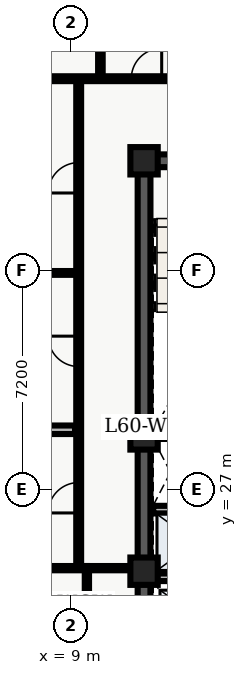
"""IFC4 building model, lengths in metres.
Left out: names, types, materials, properties, quantities, classifications, styles, units other than length and angle.
Written with IfcOpenShell. Run it as: python <this file> out.ifc"""

import sys

from ifc_helpers import new_model, entity, si_unit, converted_unit, direction, frame, origin_with_axes, origin_2d_with_axis, place, context, subcontext, project, spatial, polyline, rectangle, outline, extrude, element, fill, save


model = new_model("IFC4")
c1 = context("Model", 3, precision=1e-05, world=origin_with_axes(), true_north=direction((0.0, 1.0)))
c2 = subcontext(c1, "Body", "Model", "MODEL_VIEW")
j1 = project(units=[si_unit("LENGTHUNIT", "METRE"), converted_unit("PLANEANGLEUNIT", "DEGREE", entity("IfcPlaneAngleMeasure", 0.017), si_unit("PLANEANGLEUNIT", "RADIAN"), dimensions=[0, 0, 0, 0, 0, 0, 0])], contexts=[c1])
p1 = place(None, origin_with_axes())
s1 = spatial("IfcSite", under=j1, at=p1, CompositionType="ELEMENT")
p2 = place(p1, origin_with_axes())
s2 = spatial("IfcBuilding", under=s1, at=p2, CompositionType="ELEMENT")
p3 = place(p2, frame((0.0, 0.0, 244.2), z_axis=(0.0, 0.0, 1.0), x_axis=(1.0, 0.0, 0.0)))
s3 = spatial("IfcBuildingStorey", under=s2, at=p3, CompositionType="ELEMENT", Elevation=244.2)
p4 = place(p3, frame((11.4, 10.8, 0.0), z_axis=(0.0, 0.0, 1.0), x_axis=(0.0, 1.0, 0.0)))
e1 = element("IfcWall", 1, at=p4, inside=s3, PredefinedType="SHEAR", context=c2, shape_type="SweptSolid", body=[
    extrude(outline(polyline([(0.0, -0.21), (27.0, -0.21), (27.0, 0.21), (0.0, 0.21), (0.0, -0.21)])), origin_with_axes(), (0.0, 0.0, 1.0), 3.6),
])
p5 = place(p3, frame((11.4, 37.8, 0.0), z_axis=(0.0, 0.0, 1.0), x_axis=(1.0, 0.0, 0.0)))
e2 = element("IfcWall", 2, at=p5, inside=s3, PredefinedType="SHEAR", context=c2, shape_type="SweptSolid", body=[
    extrude(outline(polyline([(0.0, -0.21), (7.2, -0.21), (7.2, 0.21), (0.0, 0.21), (0.0, -0.21)])), origin_with_axes(), (0.0, 0.0, 1.0), 3.6),
])
p6 = place(p5, frame((2.625, 0.0, 0.0), z_axis=(0.0, 0.0, 1.0), x_axis=(1.0, 0.0, 0.0)))
e3 = element("IfcOpeningElement", 3, at=p6, cuts=e2, PredefinedType="OPENING", context=c2, shape_type="SweptSolid", body=[
    extrude(rectangle(XDim=1.05, YDim=0.44, at=origin_2d_with_axis()), origin_with_axes(), (0.0, 0.0, 1.0), 2.15),
])
p7 = place(p3, frame((11.61, 28.775, 0.0), z_axis=(0.0, 0.0, 1.0), x_axis=(1.0, 0.0, 0.0)))
e4 = element("IfcWall", 4, at=p7, inside=s3, PredefinedType="SHEAR", context=c2, shape_type="SweptSolid", body=[
    extrude(outline(polyline([(0.0, -0.125), (6.78, -0.125), (6.78, 0.125), (0.0, 0.125), (0.0, -0.125)])), origin_with_axes(), (0.0, 0.0, 1.0), 3.6),
])
p8 = place(p3, frame((11.7, 24.1, 0.0), z_axis=(0.0, 0.0, 1.0), x_axis=(1.0, 0.0, 0.0)))
e5 = element("IfcWall", 5, at=p8, inside=s3, PredefinedType="SOLIDWALL", context=c2, shape_type="SweptSolid", body=[
    extrude(outline(polyline([(0.0, -0.125), (6.6, -0.125), (6.6, 0.125), (0.0, 0.125), (0.0, -0.125)])), origin_with_axes(), (0.0, 0.0, 1.0), 2.64),
])
p9 = place(p8, frame((3.75, 0.0, 0.0), z_axis=(0.0, 0.0, 1.0), x_axis=(1.0, 0.0, 0.0)))
e6 = element("IfcOpeningElement", 6, at=p9, cuts=e5, PredefinedType="OPENING", context=c2, shape_type="SweptSolid", body=[
    extrude(rectangle(XDim=0.9, YDim=0.27, at=origin_2d_with_axis()), origin_with_axes(), (0.0, 0.0, 1.0), 2.15),
])
p10 = place(p3, frame((11.7, 26.325, 0.0), z_axis=(0.0, 0.0, 1.0), x_axis=(1.0, 0.0, 0.0)))
e7 = element("IfcWall", 7, at=p10, inside=s3, PredefinedType="SOLIDWALL", context=c2, shape_type="SweptSolid", body=[
    extrude(outline(polyline([(0.0, -0.125), (6.6, -0.125), (6.6, 0.125), (0.0, 0.125), (0.0, -0.125)])), origin_with_axes(), (0.0, 0.0, 1.0), 2.64),
])
p11 = place(p10, frame((3.5, 0.0, 0.0), z_axis=(0.0, 0.0, 1.0), x_axis=(1.0, 0.0, 0.0)))
e8 = element("IfcOpeningElement", 8, at=p11, cuts=e7, PredefinedType="OPENING", context=c2, shape_type="SweptSolid", body=[
    extrude(rectangle(XDim=0.9, YDim=0.27, at=origin_2d_with_axis()), origin_with_axes(), (0.0, 0.0, 1.0), 2.15),
])
for number, where, z_axis, x_axis in (
    (9, (11.4, 24.3, 0.0), (0.0, 0.0, 1.0), (1.0, 0.0, 0.0)),
    (10, (11.4, 28.75, 0.0), (0.0, 0.0, 1.0), (1.0, 0.0, 0.0)),
    (11, (11.4, 37.8, 0.0), (0.0, 0.0, 1.0), (1.0, 0.0, 0.0)),
):
    element("IfcColumn", number, at=place(p3, frame(where, z_axis=z_axis, x_axis=x_axis)), inside=s3, PredefinedType="COLUMN", context=c2, shape_type="SweptSolid", body=[
        extrude(rectangle(XDim=0.9, YDim=0.9, at=origin_2d_with_axis()), origin_with_axes(), (0.0, 0.0, 1.0), 3.9),
    ])
p12 = place(p3, frame((9.52, 20.4, 0.0), z_axis=(0.0, 0.0, 1.0), x_axis=(0.0, 1.0, 0.0)))
e12 = element("IfcWall", 12, at=p12, inside=s3, PredefinedType="PARTITIONING", context=c2, shape_type="SweptSolid", body=[
    extrude(outline(polyline([(0.0, -0.07), (4.0, -0.07), (4.0, 0.07), (0.0, 0.07), (0.0, -0.07)])), origin_with_axes(), (0.0, 0.0, 1.0), 2.64),
])
p13 = place(p3, frame((9.52, 24.4, 0.0), z_axis=(0.0, 0.0, 1.0), x_axis=(1.0, 0.0, 0.0)))
e13 = element("IfcWall", 13, at=p13, inside=s3, PredefinedType="PARTITIONING", context=c2, shape_type="SweptSolid", body=[
    extrude(outline(polyline([(0.0, -0.07), (1.58, -0.07), (1.58, 0.07), (0.0, 0.07), (0.0, -0.07)])), origin_with_axes(), (0.0, 0.0, 1.0), 2.64),
])
p14 = place(p3, frame((7.1, 40.5, 0.0), z_axis=(0.0, 0.0, 1.0), x_axis=(1.0, 0.0, 0.0)))
e14 = element("IfcWall", 14, at=p14, inside=s3, PredefinedType="PARTITIONING", context=c2, shape_type="SweptSolid", body=[
    extrude(outline(polyline([(0.0, -0.08), (24.965, -0.08), (24.965, 0.08), (0.0, 0.08), (0.0, -0.08)])), origin_with_axes(), (0.0, 0.0, 1.0), 2.64),
])
p15 = place(p14, frame((4.38, 0.0, 0.0), z_axis=(0.0, 0.0, 1.0), x_axis=(1.0, 0.0, 0.0)))
e15 = element("IfcOpeningElement", 15, at=p15, cuts=e14, PredefinedType="OPENING", context=c2, shape_type="SweptSolid", body=[
    extrude(rectangle(XDim=1.0, YDim=0.18, at=origin_2d_with_axis()), origin_with_axes(), (0.0, 0.0, 1.0), 2.15),
])
p16 = place(p14, frame((7.566, 0.0, 0.0), z_axis=(0.0, 0.0, 1.0), x_axis=(1.0, 0.0, 0.0)))
e16 = element("IfcOpeningElement", 16, at=p16, cuts=e14, PredefinedType="OPENING", context=c2, shape_type="SweptSolid", body=[
    extrude(rectangle(XDim=1.0, YDim=0.18, at=origin_2d_with_axis()), origin_with_axes(), (0.0, 0.0, 1.0), 2.15),
])
p17 = place(p14, frame((11.129, 0.0, 0.0), z_axis=(0.0, 0.0, 1.0), x_axis=(1.0, 0.0, 0.0)))
e17 = element("IfcOpeningElement", 17, at=p17, cuts=e14, PredefinedType="OPENING", context=c2, shape_type="SweptSolid", body=[
    extrude(rectangle(XDim=1.0, YDim=0.18, at=origin_2d_with_axis()), origin_with_axes(), (0.0, 0.0, 1.0), 2.15),
])
p18 = place(p3, frame((9.25, 24.4, 0.0), z_axis=(0.0, 0.0, 1.0), x_axis=(0.0, 1.0, 0.0)))
e18 = element("IfcWall", 18, at=p18, inside=s3, PredefinedType="PARTITIONING", context=c2, shape_type="SweptSolid", body=[
    extrude(outline(polyline([(0.0, -0.08), (16.1, -0.08), (16.1, 0.08), (0.0, 0.08), (0.0, -0.08)])), origin_with_axes(), (0.0, 0.0, 1.0), 2.64),
])
p19 = place(p18, frame((2.316, 0.0, 0.0), z_axis=(0.0, 0.0, 1.0), x_axis=(1.0, 0.0, 0.0)))
e19 = element("IfcOpeningElement", 19, at=p19, cuts=e18, PredefinedType="OPENING", context=c2, shape_type="SweptSolid", body=[
    extrude(rectangle(XDim=1.0, YDim=0.18, at=origin_2d_with_axis()), origin_with_axes(), (0.0, 0.0, 1.0), 2.15),
])
p20 = place(p18, frame((7.131, 0.0, 0.0), z_axis=(0.0, 0.0, 1.0), x_axis=(1.0, 0.0, 0.0)))
e20 = element("IfcOpeningElement", 20, at=p20, cuts=e18, PredefinedType="OPENING", context=c2, shape_type="SweptSolid", body=[
    extrude(rectangle(XDim=1.0, YDim=0.18, at=origin_2d_with_axis()), origin_with_axes(), (0.0, 0.0, 1.0), 2.15),
])
p21 = place(p18, frame((12.841, 0.0, 0.0), z_axis=(0.0, 0.0, 1.0), x_axis=(1.0, 0.0, 0.0)))
e21 = element("IfcOpeningElement", 21, at=p21, cuts=e18, PredefinedType="OPENING", context=c2, shape_type="SweptSolid", body=[
    extrude(rectangle(XDim=1.0, YDim=0.18, at=origin_2d_with_axis()), origin_with_axes(), (0.0, 0.0, 1.0), 2.15),
])
p22 = place(p3, frame((4.835, 24.4, 0.0), z_axis=(0.0, 0.0, 1.0), x_axis=(1.0, 0.0, 0.0)))
e22 = element("IfcWall", 22, at=p22, inside=s3, PredefinedType="PARTITIONING", context=c2, shape_type="SweptSolid", body=[
    extrude(outline(polyline([(0.0, -0.07), (4.685, -0.07), (4.685, 0.07), (0.0, 0.07), (0.0, -0.07)])), origin_with_axes(), (0.0, 0.0, 1.0), 2.64),
])
p23 = place(p3, frame((4.835, 28.952, 0.0), z_axis=(0.0, 0.0, 1.0), x_axis=(1.0, 0.0, 0.0)))
e23 = element("IfcWall", 23, at=p23, inside=s3, PredefinedType="PARTITIONING", context=c2, shape_type="SweptSolid", body=[
    extrude(outline(polyline([(0.0, -0.14), (4.295, -0.14), (4.295, 0.14), (0.0, 0.14), (0.0, -0.14)])), origin_with_axes(), (0.0, 0.0, 1.0), 2.64),
])
p24 = place(p3, frame((4.835, 34.111, 0.0), z_axis=(0.0, 0.0, 1.0), x_axis=(1.0, 0.0, 0.0)))
e24 = element("IfcWall", 24, at=p24, inside=s3, PredefinedType="PARTITIONING", context=c2, shape_type="SweptSolid", body=[
    extrude(outline(polyline([(0.0, -0.062), (4.295, -0.062), (4.295, 0.062), (0.0, 0.062), (0.0, -0.062)])), origin_with_axes(), (0.0, 0.0, 1.0), 2.64),
])
p25 = place(p3, frame((9.964, 40.6, 0.0), z_axis=(0.0, 0.0, 1.0), x_axis=(0.0, 1.0, 0.0)))
e25 = element("IfcWall", 25, at=p25, inside=s3, PredefinedType="PARTITIONING", context=c2, shape_type="SweptSolid", body=[
    extrude(outline(polyline([(0.0, -0.075), (7.665, -0.075), (7.665, 0.075), (0.0, 0.075), (0.0, -0.075)])), origin_with_axes(), (0.0, 0.0, 1.0), 2.64),
])
p26 = place(p25, frame((5.47, 0.0, 0.0), z_axis=(0.0, 0.0, 1.0), x_axis=(1.0, 0.0, 0.0)))
e26 = element("IfcOpeningElement", 26, at=p26, cuts=e25, PredefinedType="OPENING", context=c2, shape_type="SweptSolid", body=[
    extrude(rectangle(XDim=0.95, YDim=0.17, at=origin_2d_with_axis()), origin_with_axes(), (0.0, 0.0, 1.0), 2.15),
])
p27 = place(p18, frame((2.316, 0.0, 0.0), z_axis=(0.0, 0.0, 1.0), x_axis=(1.0, 0.0, 0.0)))
e27 = element("IfcDoor", 27, at=p27, inside=s3, OperationType="SINGLE_SWING_LEFT", PredefinedType="DOOR", context=c2, shape_type="SweptSolid", body=[
    extrude(rectangle(XDim=1.0, YDim=0.09, at=origin_2d_with_axis()), origin_with_axes(), (0.0, 0.0, 1.0), 2.15),
])
fill(e19, e27)
p28 = place(p18, frame((7.131, 0.0, 0.0), z_axis=(0.0, 0.0, 1.0), x_axis=(1.0, 0.0, 0.0)))
e28 = element("IfcDoor", 28, at=p28, inside=s3, OperationType="SINGLE_SWING_RIGHT", PredefinedType="DOOR", context=c2, shape_type="SweptSolid", body=[
    extrude(rectangle(XDim=1.0, YDim=0.09, at=origin_2d_with_axis()), origin_with_axes(), (0.0, 0.0, 1.0), 2.15),
])
fill(e20, e28)
p29 = place(p18, frame((12.841, 0.0, 0.0), z_axis=(0.0, 0.0, 1.0), x_axis=(1.0, 0.0, 0.0)))
e29 = element("IfcDoor", 29, at=p29, inside=s3, OperationType="SINGLE_SWING_LEFT", PredefinedType="DOOR", context=c2, shape_type="SweptSolid", body=[
    extrude(rectangle(XDim=1.0, YDim=0.09, at=origin_2d_with_axis()), origin_with_axes(), (0.0, 0.0, 1.0), 2.15),
])
fill(e21, e29)
p30 = place(p14, frame((4.38, 0.0, 0.0), z_axis=(0.0, 0.0, 1.0), x_axis=(1.0, 0.0, 0.0)))
e30 = element("IfcDoor", 30, at=p30, inside=s3, OperationType="SINGLE_SWING_RIGHT", PredefinedType="DOOR", context=c2, shape_type="SweptSolid", body=[
    extrude(rectangle(XDim=1.0, YDim=0.09, at=origin_2d_with_axis()), origin_with_axes(), (0.0, 0.0, 1.0), 2.15),
])
fill(e15, e30)
save(model, sys.argv[1])
